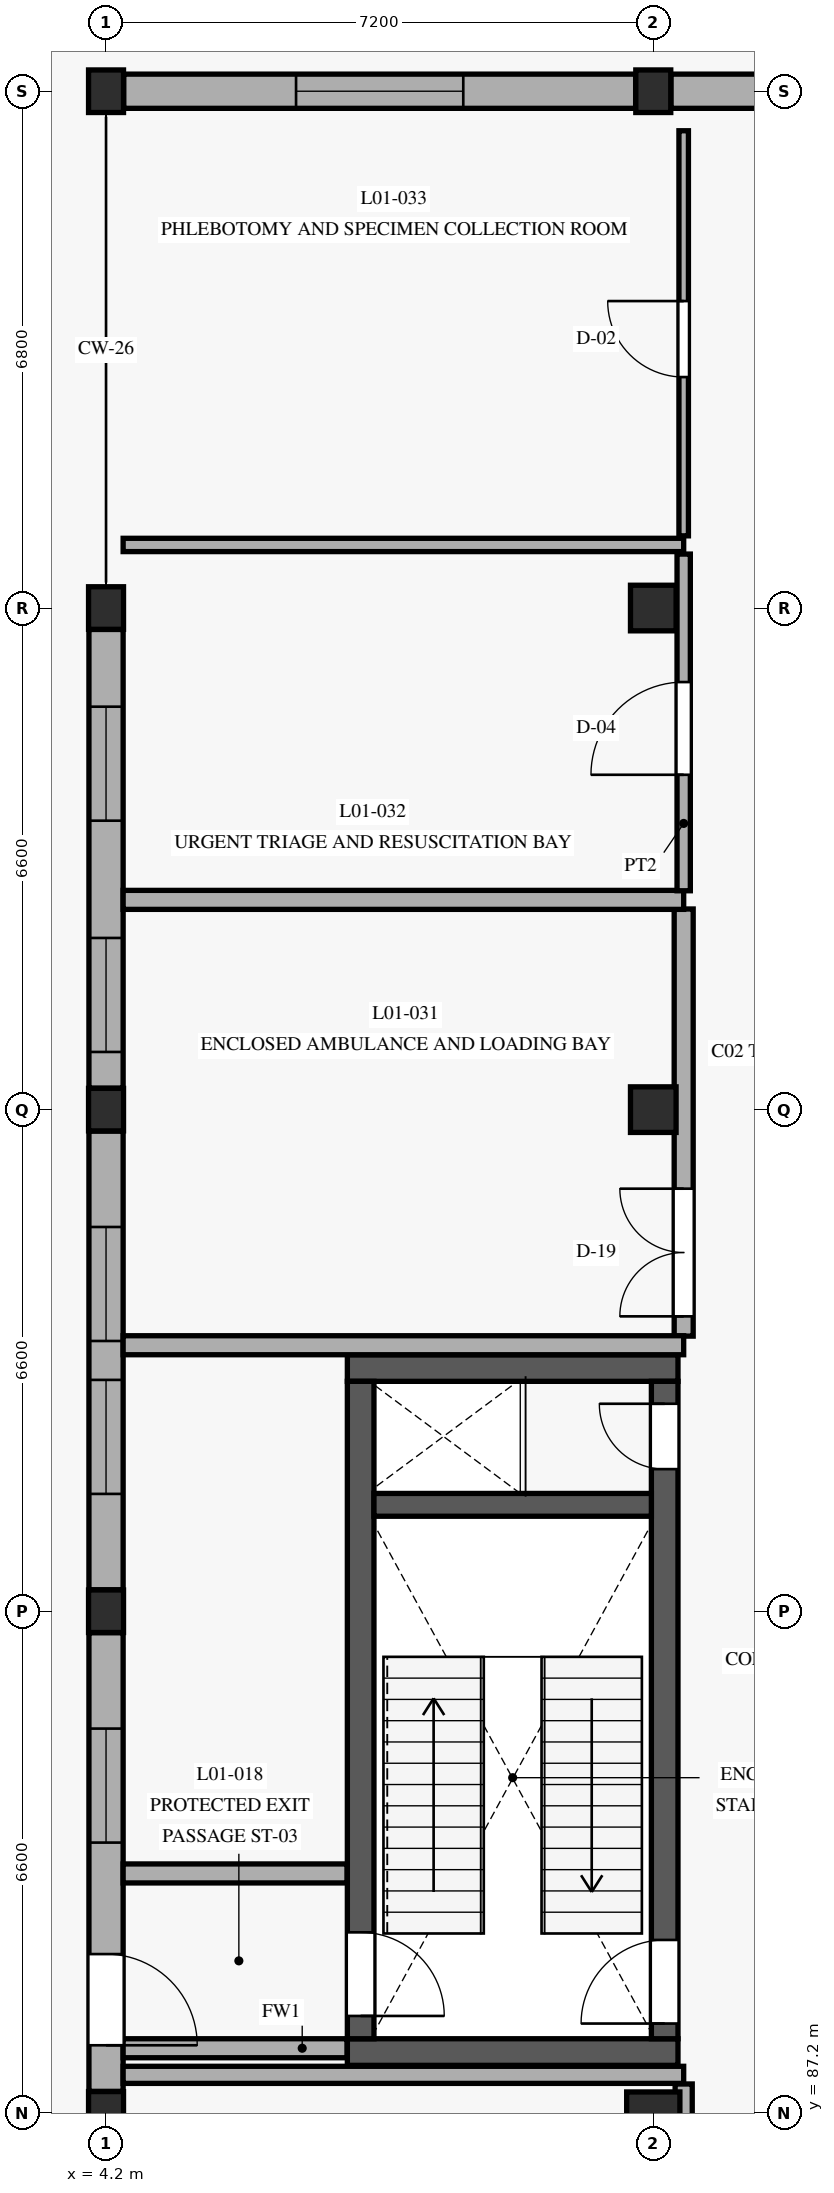
"""IFC4 building model, lengths in metres.
Left out: names, types, materials, properties, quantities, classifications, styles, units other than length and angle.
Written with IfcOpenShell. Run it as: python <this file> out.ifc"""

import sys

from ifc_helpers import new_model, si_unit, direction, frame, frame_2d, origin, origin_with_axes, origin_2d, place, context, subcontext, project, spatial, rectangle, extrude, element, fill, save


model = new_model("IFC4")
c1 = context("Model", 3, precision=1e-05, world=origin(), true_north=direction((0.0, 1.0)))
c2 = subcontext(c1, "Body", "Model", "MODEL_VIEW")
j1 = project(units=[si_unit("LENGTHUNIT", "METRE"), si_unit("PLANEANGLEUNIT", "RADIAN")], contexts=[c1])
p1 = place(None, origin())
s1 = spatial("IfcSite", under=j1, at=p1, CompositionType="ELEMENT")
p2 = place(p1, origin())
s2 = spatial("IfcBuilding", under=s1, at=p2, CompositionType="ELEMENT")
p3 = place(p2, origin())
s3 = spatial("IfcBuildingStorey", under=s2, at=p3, CompositionType="ELEMENT", Elevation=0.0)
for number, where, z_axis, x_axis in (
    (1, (4.2, 87.2, 0.0), (0.0, 0.0, 1.0), (1.0, 0.0, 0.0)),
    (2, (4.2, 93.8, 0.0), (0.0, 0.0, 1.0), (1.0, 0.0, 0.0)),
    (3, (4.2, 100.4, 0.0), (0.0, 0.0, 1.0), (1.0, 0.0, 0.0)),
    (4, (4.2, 107.0, 0.0), (0.0, 0.0, 1.0), (1.0, 0.0, 0.0)),
    (5, (4.2, 113.8, 0.0), (0.0, 0.0, 1.0), (1.0, 0.0, 0.0)),
):
    element("IfcColumn", number, at=place(p3, frame(where, z_axis=z_axis, x_axis=x_axis)), inside=s3, PredefinedType="COLUMN", context=c2, shape_type="SweptSolid", body=[
        extrude(rectangle(XDim=0.46, YDim=0.56, at=origin_2d()), origin(), (0.0, 0.0, 1.0), 4.8),
    ])
p4 = place(p3, frame((11.4, 87.2, 0.0), z_axis=(0.0, 0.0, 1.0), x_axis=(1.0, 0.0, 0.0)))
e6 = element("IfcColumn", 6, at=p4, inside=s3, PredefinedType="COLUMN", context=c2, shape_type="SweptSolid", body=[
    extrude(rectangle(XDim=0.7, YDim=0.55, at=origin_2d()), origin(), (0.0, 0.0, 1.0), 4.8),
])
for number, where, z_axis, x_axis in (
    (7, (11.4, 100.4, 0.0), (0.0, 0.0, 1.0), (1.0, 0.0, 0.0)),
    (8, (11.4, 107.0, 0.0), (0.0, 0.0, 1.0), (1.0, 0.0, 0.0)),
):
    element("IfcColumn", number, at=place(p3, frame(where, z_axis=z_axis, x_axis=x_axis)), inside=s3, PredefinedType="COLUMN", context=c2, shape_type="SweptSolid", body=[
        extrude(rectangle(XDim=0.6, YDim=0.6, at=origin_2d()), origin(), (0.0, 0.0, 1.0), 4.8),
    ])
p5 = place(p3, frame((11.4, 113.8, 0.0), z_axis=(0.0, 0.0, 1.0), x_axis=(1.0, 0.0, 0.0)))
e9 = element("IfcColumn", 9, at=p5, inside=s3, PredefinedType="COLUMN", context=c2, shape_type="SweptSolid", body=[
    extrude(rectangle(XDim=0.46, YDim=0.56, at=origin_2d()), origin(), (0.0, 0.0, 1.0), 4.8),
])
for number, where, z_axis, x_axis in (
    (10, (7.375, 88.0, 0.0), (0.0, 0.0, 1.0), (1.0, 0.0, 0.0)),
    (11, (11.725, 97.0, 0.0), (0.0, 0.0, 1.0), (-1.0, 0.0, 0.0)),
):
    element("IfcWall", number, at=place(p3, frame(where, z_axis=z_axis, x_axis=x_axis)), inside=s3, PredefinedType="SHEAR", context=c2, shape_type="SweptSolid", body=[
        extrude(rectangle(XDim=4.35, YDim=0.35, at=frame_2d((2.175, 0.0))), origin(), (0.0, 0.0, 1.0), 4.42),
    ])
p6 = place(p3, frame((7.55, 96.825, 0.0), z_axis=(0.0, 0.0, 1.0), x_axis=(0.0, -1.0, 0.0)))
e12 = element("IfcWall", 12, at=p6, inside=s3, PredefinedType="SHEAR", context=c2, shape_type="SweptSolid", body=[
    extrude(rectangle(XDim=8.65, YDim=0.35, at=frame_2d((4.325, 0.0))), origin(), (0.0, 0.0, 1.0), 4.42),
])
p7 = place(p6, frame((7.25, 0.0, 0.0)))
e13 = element("IfcOpeningElement", 13, at=p7, cuts=e12, PredefinedType="OPENING", context=c2, shape_type="SweptSolid", body=[
    extrude(rectangle(XDim=1.1, YDim=2.2, at=frame_2d((0.55, 1.1))), frame((0.0, 0.185, 0.0), z_axis=(0.0, -1.0, 0.0), x_axis=(1.0, 0.0, 0.0)), (0.0, 0.0, 1.0), 0.37),
])
p8 = place(p3, frame((11.55, 88.175, 0.0), z_axis=(0.0, 0.0, 1.0), x_axis=(0.0, 1.0, 0.0)))
e14 = element("IfcWall", 14, at=p8, inside=s3, PredefinedType="SHEAR", context=c2, shape_type="SweptSolid", body=[
    extrude(rectangle(XDim=8.65, YDim=0.35, at=frame_2d((4.325, 0.0))), origin(), (0.0, 0.0, 1.0), 4.42),
])
p9 = place(p8, frame((0.2, 0.0, 0.0)))
e15 = element("IfcOpeningElement", 15, at=p9, cuts=e14, PredefinedType="OPENING", context=c2, shape_type="SweptSolid", body=[
    extrude(rectangle(XDim=1.1, YDim=2.2, at=frame_2d((0.55, 1.1))), frame((0.0, 0.185, 0.0), z_axis=(0.0, -1.0, 0.0), x_axis=(1.0, 0.0, 0.0)), (0.0, 0.0, 1.0), 0.37),
])
p10 = place(p8, frame((7.495, 0.0, 0.0)))
e16 = element("IfcOpeningElement", 16, at=p10, cuts=e14, PredefinedType="OPENING", context=c2, shape_type="SweptSolid", body=[
    extrude(rectangle(XDim=0.86, YDim=2.05, at=frame_2d((0.43, 1.025))), frame((0.0, 0.185, 0.0), z_axis=(0.0, -1.0, 0.0), x_axis=(1.0, 0.0, 0.0)), (0.0, 0.0, 1.0), 0.37),
])
p11 = place(p3, frame((7.725, 95.2, 0.0), z_axis=(0.0, 0.0, 1.0), x_axis=(1.0, 0.0, 0.0)))
e17 = element("IfcWall", 17, at=p11, inside=s3, PredefinedType="SHEAR", context=c2, shape_type="SweptSolid", body=[
    extrude(rectangle(XDim=3.65, YDim=0.3, at=frame_2d((1.825, 0.0))), origin(), (0.0, 0.0, 1.0), 4.42),
])
p12 = place(p3, frame((4.2, 93.518, 0.0), z_axis=(0.0, 0.0, 1.0), x_axis=(0.0, -1.0, 0.0)))
e18 = element("IfcWall", 18, at=p12, inside=s3, PredefinedType="SOLIDWALL", context=c2, shape_type="SweptSolid", body=[
    extrude(rectangle(XDim=6.036, YDim=0.45, at=frame_2d((3.018, 0.0))), origin(), (0.0, 0.0, 1.0), 3.87),
])
p13 = place(p12, frame((4.229, 0.0, 0.0)))
e19 = element("IfcOpeningElement", 19, at=p13, cuts=e18, PredefinedType="OPENING", context=c2, shape_type="SweptSolid", body=[
    extrude(rectangle(XDim=1.2, YDim=2.25, at=frame_2d((0.6, 1.125))), frame((0.0, 0.235, 0.0), z_axis=(0.0, -1.0, 0.0), x_axis=(1.0, 0.0, 0.0)), (0.0, 0.0, 1.0), 0.47),
])
p14 = place(p12, frame((1.262, 0.0, 0.65)))
e20 = element("IfcOpeningElement", 20, at=p14, cuts=e18, PredefinedType="OPENING", context=c2, shape_type="SweptSolid", body=[
    extrude(rectangle(XDim=1.5, YDim=2.2, at=frame_2d((0.75, 1.1))), frame((0.0, 0.235, 0.0), z_axis=(0.0, -1.0, 0.0), x_axis=(1.0, 0.0, 0.0)), (0.0, 0.0, 1.0), 0.47),
])
p15 = place(p3, frame((4.2, 100.118, 0.0), z_axis=(0.0, 0.0, 1.0), x_axis=(0.0, -1.0, 0.0)))
e21 = element("IfcWall", 21, at=p15, inside=s3, PredefinedType="SOLIDWALL", context=c2, shape_type="SweptSolid", body=[
    extrude(rectangle(XDim=6.036, YDim=0.45, at=frame_2d((3.018, 0.0))), origin(), (0.0, 0.0, 1.0), 3.87),
])
p16 = place(p15, frame((1.262, 0.0, 0.65)))
e22 = element("IfcOpeningElement", 22, at=p16, cuts=e21, PredefinedType="OPENING", context=c2, shape_type="SweptSolid", body=[
    extrude(rectangle(XDim=1.5, YDim=2.2, at=frame_2d((0.75, 1.1))), frame((0.0, 0.235, 0.0), z_axis=(0.0, -1.0, 0.0), x_axis=(1.0, 0.0, 0.0)), (0.0, 0.0, 1.0), 0.47),
])
p17 = place(p15, frame((3.274, 0.0, 0.65)))
e23 = element("IfcOpeningElement", 23, at=p17, cuts=e21, PredefinedType="OPENING", context=c2, shape_type="SweptSolid", body=[
    extrude(rectangle(XDim=1.5, YDim=2.2, at=frame_2d((0.75, 1.1))), frame((0.0, 0.235, 0.0), z_axis=(0.0, -1.0, 0.0), x_axis=(1.0, 0.0, 0.0)), (0.0, 0.0, 1.0), 0.47),
])
p18 = place(p3, frame((4.2, 106.718, 0.0), z_axis=(0.0, 0.0, 1.0), x_axis=(0.0, -1.0, 0.0)))
e24 = element("IfcWall", 24, at=p18, inside=s3, PredefinedType="SOLIDWALL", context=c2, shape_type="SweptSolid", body=[
    extrude(rectangle(XDim=6.036, YDim=0.45, at=frame_2d((3.018, 0.0))), origin(), (0.0, 0.0, 1.0), 3.87),
])
p19 = place(p18, frame((1.016, 0.0, 0.65)))
e25 = element("IfcOpeningElement", 25, at=p19, cuts=e24, PredefinedType="OPENING", context=c2, shape_type="SweptSolid", body=[
    extrude(rectangle(XDim=1.5, YDim=2.2, at=frame_2d((0.75, 1.1))), frame((0.0, 0.235, 0.0), z_axis=(0.0, -1.0, 0.0), x_axis=(1.0, 0.0, 0.0)), (0.0, 0.0, 1.0), 0.47),
])
p20 = place(p18, frame((4.059, 0.0, 0.65)))
e26 = element("IfcOpeningElement", 26, at=p20, cuts=e24, PredefinedType="OPENING", context=c2, shape_type="SweptSolid", body=[
    extrude(rectangle(XDim=1.5, YDim=2.2, at=frame_2d((0.75, 1.1))), frame((0.0, 0.235, 0.0), z_axis=(0.0, -1.0, 0.0), x_axis=(1.0, 0.0, 0.0)), (0.0, 0.0, 1.0), 0.47),
])
p21 = place(p3, frame((18.968, 113.8, 0.0), z_axis=(0.0, 0.0, 1.0), x_axis=(-1.0, 0.0, 0.0)))
e27 = element("IfcWall", 27, at=p21, inside=s3, PredefinedType="SOLIDWALL", context=c2, shape_type="SweptSolid", body=[
    extrude(rectangle(XDim=7.336, YDim=0.45, at=frame_2d((3.668, 0.0))), origin(), (0.0, 0.0, 1.0), 3.92),
])
p22 = place(p21, frame((2.568, 0.0, 0.9)))
e28 = element("IfcOpeningElement", 28, at=p22, cuts=e27, PredefinedType="OPENING", context=c2, shape_type="SweptSolid", body=[
    extrude(rectangle(XDim=2.2, YDim=1.1, at=frame_2d((1.1, 0.55))), frame((0.0, 0.235, 0.0), z_axis=(0.0, -1.0, 0.0), x_axis=(1.0, 0.0, 0.0)), (0.0, 0.0, 1.0), 0.47),
])
p23 = place(p3, frame((11.168, 113.8, 0.0), z_axis=(0.0, 0.0, 1.0), x_axis=(-1.0, 0.0, 0.0)))
e29 = element("IfcWall", 29, at=p23, inside=s3, PredefinedType="SOLIDWALL", context=c2, shape_type="SweptSolid", body=[
    extrude(rectangle(XDim=6.736, YDim=0.45, at=frame_2d((3.368, 0.0))), origin(), (0.0, 0.0, 1.0), 3.92),
])
p24 = place(p23, frame((2.268, 0.0, 0.9)))
e30 = element("IfcOpeningElement", 30, at=p24, cuts=e29, PredefinedType="OPENING", context=c2, shape_type="SweptSolid", body=[
    extrude(rectangle(XDim=2.2, YDim=1.1, at=frame_2d((1.1, 0.55))), frame((0.0, 0.235, 0.0), z_axis=(0.0, -1.0, 0.0), x_axis=(1.0, 0.0, 0.0)), (0.0, 0.0, 1.0), 0.47),
])
for number, where, z_axis, x_axis in (
    (31, (4.425, 88.05, 0.0), (0.0, 0.0, 1.0), (1.0, 0.0, 0.0)),
    (32, (4.425, 90.35, 0.0), (0.0, 0.0, 1.0), (1.0, 0.0, 0.0)),
):
    element("IfcWall", number, at=place(p3, frame(where, z_axis=z_axis, x_axis=x_axis)), inside=s3, PredefinedType="SOLIDWALL", context=c2, shape_type="SweptSolid", body=[
        extrude(rectangle(XDim=2.945, YDim=0.25, at=frame_2d((1.473, 0.0))), origin(), (0.0, 0.0, 1.0), 3.865),
    ])
p25 = place(p3, frame((11.8, 78.53, 0.0), z_axis=(0.0, 0.0, 1.0), x_axis=(0.0, 1.0, 0.0)))
e33 = element("IfcWall", 33, at=p25, inside=s3, PredefinedType="SOLIDWALL", context=c2, shape_type="SweptSolid", body=[
    extrude(rectangle(XDim=9.05, YDim=0.225, at=frame_2d((4.525, 0.0))), origin(), (0.0, 0.0, 1.0), 3.865),
])
p26 = place(p25, frame((3.885, 0.0, 0.0)))
e34 = element("IfcOpeningElement", 34, at=p26, cuts=e33, PredefinedType="OPENING", context=c2, shape_type="SweptSolid", body=[
    extrude(rectangle(XDim=1.28, YDim=2.25, at=frame_2d((0.64, 1.125))), frame((0.0, 0.123, 0.0), z_axis=(0.0, -1.0, 0.0), x_axis=(1.0, 0.0, 0.0)), (0.0, 0.0, 1.0), 0.245),
])
p27 = place(p3, frame((4.425, 87.7, 0.0), z_axis=(0.0, 0.0, 1.0), x_axis=(1.0, 0.0, 0.0)))
e35 = element("IfcWall", 35, at=p27, inside=s3, PredefinedType="SOLIDWALL", context=c2, shape_type="SweptSolid", body=[
    extrude(rectangle(XDim=7.375, YDim=0.225, at=frame_2d((3.688, 0.0))), origin(), (0.0, 0.0, 1.0), 3.865),
])
p28 = place(p3, frame((11.8, 97.42, 0.0), z_axis=(0.0, 0.0, 1.0), x_axis=(0.0, 1.0, 0.0)))
e36 = element("IfcWall", 36, at=p28, inside=s3, PredefinedType="SOLIDWALL", context=c2, shape_type="SweptSolid", body=[
    extrude(rectangle(XDim=5.62, YDim=0.25, at=frame_2d((2.81, 0.0))), origin(), (0.0, 0.0, 1.0), 3.895),
])
p29 = place(p28, frame((0.26, 0.0, 0.0)))
e37 = element("IfcOpeningElement", 37, at=p29, cuts=e36, PredefinedType="OPENING", context=c2, shape_type="SweptSolid", body=[
    extrude(rectangle(XDim=1.68, YDim=2.25, at=frame_2d((0.84, 1.125))), frame((0.0, 0.135, 0.0), z_axis=(0.0, -1.0, 0.0), x_axis=(1.0, 0.0, 0.0)), (0.0, 0.0, 1.0), 0.27),
])
for number, where, z_axis, x_axis in (
    (38, (4.425, 103.16, 0.0), (0.0, 0.0, 1.0), (1.0, 0.0, 0.0)),
    (39, (4.425, 97.3, 0.0), (0.0, 0.0, 1.0), (1.0, 0.0, 0.0)),
):
    element("IfcWall", number, at=place(p3, frame(where, z_axis=z_axis, x_axis=x_axis)), inside=s3, PredefinedType="SOLIDWALL", context=c2, shape_type="SweptSolid", body=[
        extrude(rectangle(XDim=7.375, YDim=0.25, at=frame_2d((3.688, 0.0))), origin(), (0.0, 0.0, 1.0), 3.865),
    ])
p30 = place(p3, frame((11.8, 103.28, 0.0), z_axis=(0.0, 0.0, 1.0), x_axis=(0.0, 1.0, 0.0)))
e40 = element("IfcWall", 40, at=p30, inside=s3, PredefinedType="PARTITIONING", context=c2, shape_type="SweptSolid", body=[
    extrude(rectangle(XDim=4.43, YDim=0.175, at=frame_2d((2.215, 0.0))), origin(), (0.0, 0.0, 1.0), 3.895),
])
p31 = place(p30, frame((1.526, 0.0, 0.0)))
e41 = element("IfcOpeningElement", 41, at=p31, cuts=e40, PredefinedType="OPENING", context=c2, shape_type="SweptSolid", body=[
    extrude(rectangle(XDim=1.22, YDim=2.2, at=frame_2d((0.61, 1.1))), frame((0.0, 0.098, 0.0), z_axis=(0.0, -1.0, 0.0), x_axis=(1.0, 0.0, 0.0)), (0.0, 0.0, 1.0), 0.195),
])
p32 = place(p3, frame((4.425, 107.83, 0.0), z_axis=(0.0, 0.0, 1.0), x_axis=(1.0, 0.0, 0.0)))
e42 = element("IfcWall", 42, at=p32, inside=s3, PredefinedType="PARTITIONING", context=c2, shape_type="SweptSolid", body=[
    extrude(rectangle(XDim=7.375, YDim=0.175, at=frame_2d((3.688, 0.0))), origin(), (0.0, 0.0, 1.0), 3.865),
])
p33 = place(p3, frame((11.8, 107.95, 0.0), z_axis=(0.0, 0.0, 1.0), x_axis=(0.0, 1.0, 0.0)))
e43 = element("IfcWall", 43, at=p33, inside=s3, PredefinedType="PARTITIONING", context=c2, shape_type="SweptSolid", body=[
    extrude(rectangle(XDim=5.33, YDim=0.125, at=frame_2d((2.665, 0.0))), origin(), (0.0, 0.0, 1.0), 3.895),
])
p34 = place(p33, frame((2.089, 0.0, 0.0)))
e44 = element("IfcOpeningElement", 44, at=p34, cuts=e43, PredefinedType="OPENING", context=c2, shape_type="SweptSolid", body=[
    extrude(rectangle(XDim=1.0, YDim=2.15, at=frame_2d((0.5, 1.075))), frame((0.0, 0.073, 0.0), z_axis=(0.0, -1.0, 0.0), x_axis=(1.0, 0.0, 0.0)), (0.0, 0.0, 1.0), 0.145),
])
p35 = place(p9, origin_with_axes())
e45 = element("IfcDoor", 45, at=p35, inside=s3, OperationType="SINGLE_SWING_LEFT", PredefinedType="DOOR", context=c2, shape_type="SweptSolid", body=[
    extrude(rectangle(XDim=1.1, YDim=2.2, at=frame_2d((0.55, 1.1))), frame((0.0, 0.025, 0.0), z_axis=(0.0, -1.0, 0.0), x_axis=(1.0, 0.0, 0.0)), (0.0, 0.0, 1.0), 0.05),
])
fill(e15, e45)
p36 = place(p7, frame((1.1, 0.0, 0.0), z_axis=(0.0, 0.0, 1.0), x_axis=(-1.0, 0.0, 0.0)))
e46 = element("IfcDoor", 46, at=p36, inside=s3, OperationType="SINGLE_SWING_LEFT", PredefinedType="DOOR", context=c2, shape_type="SweptSolid", body=[
    extrude(rectangle(XDim=1.1, YDim=2.2, at=frame_2d((0.55, 1.1))), frame((0.0, 0.025, 0.0), z_axis=(0.0, -1.0, 0.0), x_axis=(1.0, 0.0, 0.0)), (0.0, 0.0, 1.0), 0.05),
])
fill(e13, e46)
p37 = place(p10, origin_with_axes())
e47 = element("IfcDoor", 47, at=p37, inside=s3, OperationType="SINGLE_SWING_RIGHT", PredefinedType="DOOR", context=c2, shape_type="SweptSolid", body=[
    extrude(rectangle(XDim=0.86, YDim=2.05, at=frame_2d((0.43, 1.025))), frame((0.0, 0.025, 0.0), z_axis=(0.0, -1.0, 0.0), x_axis=(1.0, 0.0, 0.0)), (0.0, 0.0, 1.0), 0.05),
])
fill(e16, e47)
p38 = place(p13, frame((1.2, 0.0, 0.0), z_axis=(0.0, 0.0, 1.0), x_axis=(-1.0, 0.0, 0.0)))
e48 = element("IfcDoor", 48, at=p38, inside=s3, OperationType="SINGLE_SWING_LEFT", PredefinedType="DOOR", context=c2, shape_type="SweptSolid", body=[
    extrude(rectangle(XDim=1.2, YDim=2.25, at=frame_2d((0.6, 1.125))), frame((0.0, 0.025, 0.0), z_axis=(0.0, -1.0, 0.0), x_axis=(1.0, 0.0, 0.0)), (0.0, 0.0, 1.0), 0.05),
])
fill(e19, e48)
p39 = place(p14, origin_with_axes())
e49 = element("IfcWindow", 49, at=p39, inside=s3, PartitioningType="SINGLE_PANEL", PredefinedType="WINDOW", context=c2, shape_type="SweptSolid", body=[
    extrude(rectangle(XDim=1.5, YDim=2.2, at=frame_2d((0.75, 1.1))), frame((0.0, 0.03, 0.0), z_axis=(0.0, -1.0, 0.0), x_axis=(1.0, 0.0, 0.0)), (0.0, 0.0, 1.0), 0.06),
])
fill(e20, e49)
p40 = place(p16, origin_with_axes())
e50 = element("IfcWindow", 50, at=p40, inside=s3, PartitioningType="SINGLE_PANEL", PredefinedType="WINDOW", context=c2, shape_type="SweptSolid", body=[
    extrude(rectangle(XDim=1.5, YDim=2.2, at=frame_2d((0.75, 1.1))), frame((0.0, 0.03, 0.0), z_axis=(0.0, -1.0, 0.0), x_axis=(1.0, 0.0, 0.0)), (0.0, 0.0, 1.0), 0.06),
])
fill(e22, e50)
p41 = place(p17, origin_with_axes())
e51 = element("IfcWindow", 51, at=p41, inside=s3, PartitioningType="SINGLE_PANEL", PredefinedType="WINDOW", context=c2, shape_type="SweptSolid", body=[
    extrude(rectangle(XDim=1.5, YDim=2.2, at=frame_2d((0.75, 1.1))), frame((0.0, 0.03, 0.0), z_axis=(0.0, -1.0, 0.0), x_axis=(1.0, 0.0, 0.0)), (0.0, 0.0, 1.0), 0.06),
])
fill(e23, e51)
p42 = place(p19, origin_with_axes())
e52 = element("IfcWindow", 52, at=p42, inside=s3, PartitioningType="SINGLE_PANEL", PredefinedType="WINDOW", context=c2, shape_type="SweptSolid", body=[
    extrude(rectangle(XDim=1.5, YDim=2.2, at=frame_2d((0.75, 1.1))), frame((0.0, 0.03, 0.0), z_axis=(0.0, -1.0, 0.0), x_axis=(1.0, 0.0, 0.0)), (0.0, 0.0, 1.0), 0.06),
])
fill(e25, e52)
p43 = place(p20, origin_with_axes())
e53 = element("IfcWindow", 53, at=p43, inside=s3, PartitioningType="SINGLE_PANEL", PredefinedType="WINDOW", context=c2, shape_type="SweptSolid", body=[
    extrude(rectangle(XDim=1.5, YDim=2.2, at=frame_2d((0.75, 1.1))), frame((0.0, 0.03, 0.0), z_axis=(0.0, -1.0, 0.0), x_axis=(1.0, 0.0, 0.0)), (0.0, 0.0, 1.0), 0.06),
])
fill(e26, e53)
p44 = place(p24, origin_with_axes())
e54 = element("IfcWindow", 54, at=p44, inside=s3, PartitioningType="SINGLE_PANEL", PredefinedType="WINDOW", context=c2, shape_type="SweptSolid", body=[
    extrude(rectangle(XDim=2.2, YDim=1.1, at=frame_2d((1.1, 0.55))), frame((0.0, 0.03, 0.0), z_axis=(0.0, -1.0, 0.0), x_axis=(1.0, 0.0, 0.0)), (0.0, 0.0, 1.0), 0.06),
])
fill(e30, e54)
p45 = place(p29, origin_with_axes())
e55 = element("IfcDoor", 55, at=p45, inside=s3, OperationType="DOUBLE_DOOR_SINGLE_SWING", PredefinedType="DOOR", context=c2, shape_type="SweptSolid", body=[
    extrude(rectangle(XDim=1.68, YDim=2.25, at=frame_2d((0.84, 1.125))), frame((0.0, 0.025, 0.0), z_axis=(0.0, -1.0, 0.0), x_axis=(1.0, 0.0, 0.0)), (0.0, 0.0, 1.0), 0.05),
])
fill(e37, e55)
p46 = place(p31, origin_with_axes())
e56 = element("IfcDoor", 56, at=p46, inside=s3, OperationType="SINGLE_SWING_LEFT", PredefinedType="DOOR", context=c2, shape_type="SweptSolid", body=[
    extrude(rectangle(XDim=1.22, YDim=2.2, at=frame_2d((0.61, 1.1))), frame((0.0, 0.025, 0.0), z_axis=(0.0, -1.0, 0.0), x_axis=(1.0, 0.0, 0.0)), (0.0, 0.0, 1.0), 0.05),
])
fill(e41, e56)
p47 = place(p34, origin_with_axes())
e57 = element("IfcDoor", 57, at=p47, inside=s3, OperationType="SINGLE_SWING_RIGHT", PredefinedType="DOOR", context=c2, shape_type="SweptSolid", body=[
    extrude(rectangle(XDim=1.0, YDim=2.15, at=frame_2d((0.5, 1.075))), frame((0.0, 0.025, 0.0), z_axis=(0.0, -1.0, 0.0), x_axis=(1.0, 0.0, 0.0)), (0.0, 0.0, 1.0), 0.05),
])
fill(e44, e57)
save(model, sys.argv[1])
